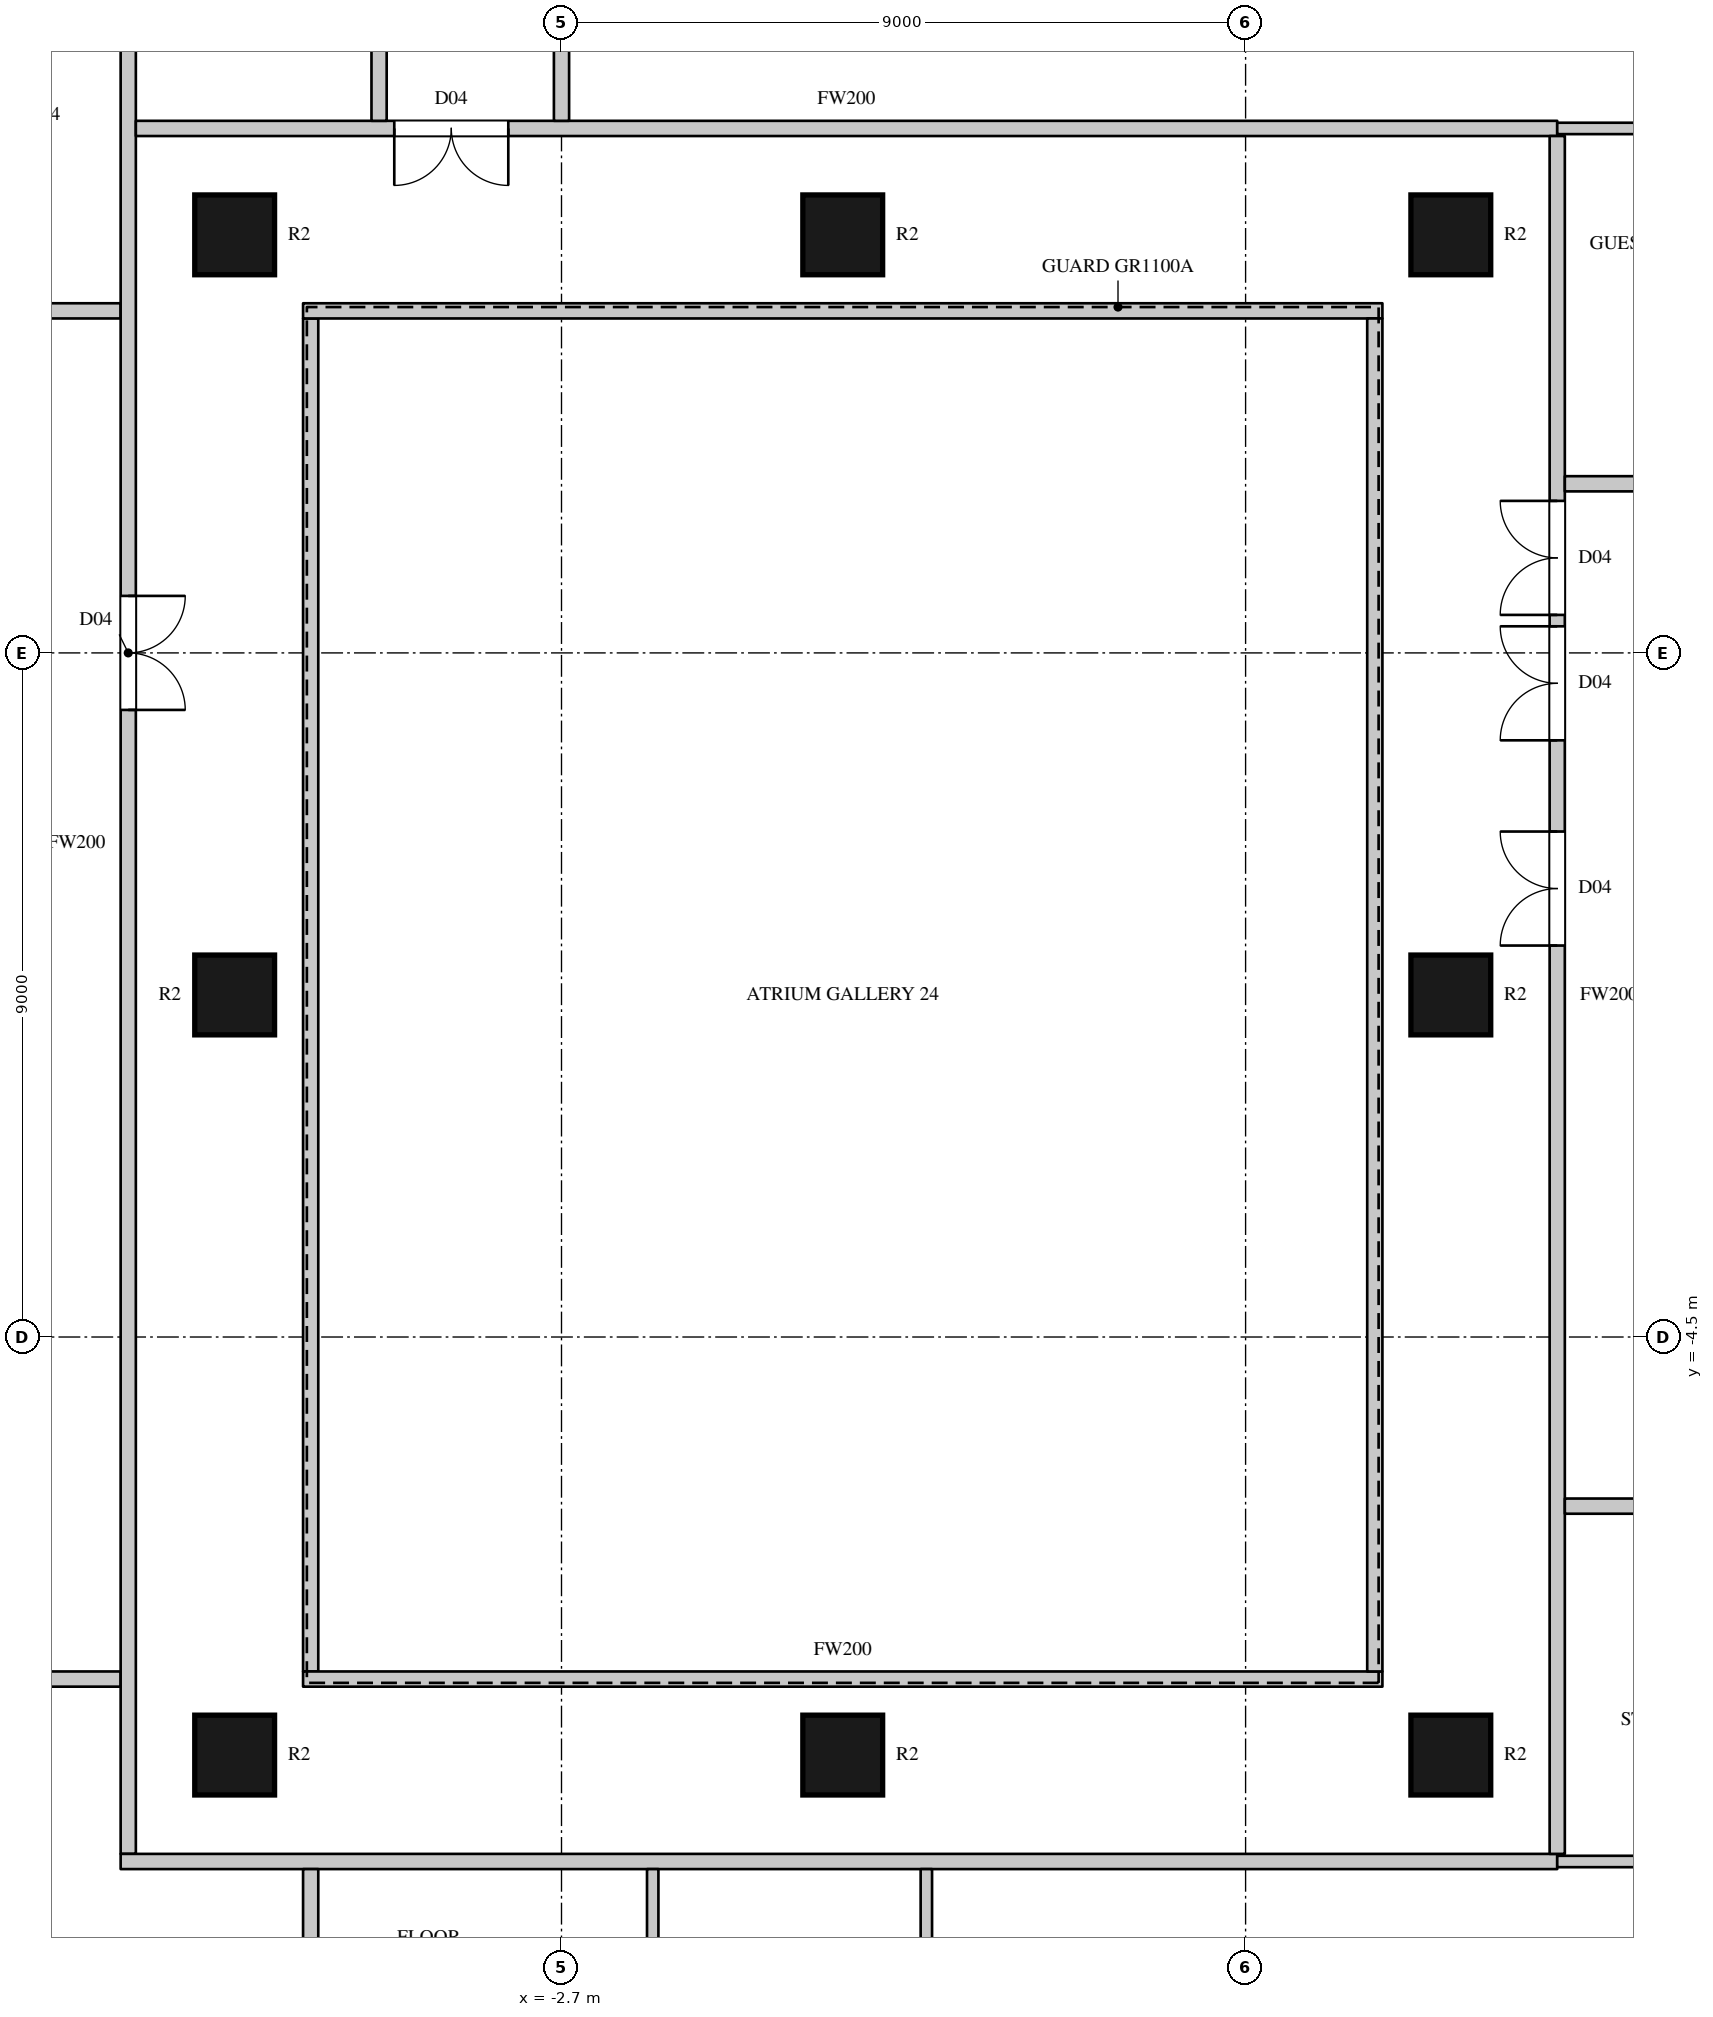
"""IFC4 building model, lengths in metres.
Left out: names, types, materials, properties, quantities, classifications, styles, units other than length and angle.
Written with IfcOpenShell. Run it as: python <this file> out.ifc"""

import sys

from ifc_helpers import new_model, si_unit, direction, frame, frame_2d, origin, origin_2d, place, context, subcontext, project, spatial, rectangle, circle, extrude, element, fill, save


model = new_model("IFC4")
c1 = context("Model", 3, precision=1e-05, world=origin(), true_north=direction((0.0, 1.0)))
c2 = subcontext(c1, "Body", "Model", "MODEL_VIEW")
j1 = project(units=[si_unit("LENGTHUNIT", "METRE"), si_unit("PLANEANGLEUNIT", "RADIAN")], contexts=[c1])
p1 = place(None, origin())
s1 = spatial("IfcSite", under=j1, at=p1, CompositionType="ELEMENT")
p2 = place(p1, origin())
s2 = spatial("IfcBuilding", under=s1, at=p2, CompositionType="ELEMENT")
p3 = place(p2, frame((0.0, 0.0, 116.7)))
s3 = spatial("IfcBuildingStorey", under=s2, at=p3, CompositionType="ELEMENT", Elevation=116.7)
for number, where, z_axis, x_axis in (
    (1, (-7.0, -10.0, 0.0), (0.0, 0.0, 1.0), (1.0, 0.0, 0.0)),
    (2, (-7.0, 0.0, 0.0), (0.0, 0.0, 1.0), (1.0, 0.0, 0.0)),
    (3, (-7.0, 10.0, 0.0), (0.0, 0.0, 1.0), (1.0, 0.0, 0.0)),
    (4, (1.0, -10.0, 0.0), (0.0, 0.0, 1.0), (1.0, 0.0, 0.0)),
    (5, (1.0, 10.0, 0.0), (0.0, 0.0, 1.0), (1.0, 0.0, 0.0)),
    (6, (9.0, -10.0, 0.0), (0.0, 0.0, 1.0), (1.0, 0.0, 0.0)),
    (7, (9.0, 0.0, 0.0), (0.0, 0.0, 1.0), (1.0, 0.0, 0.0)),
    (8, (9.0, 10.0, 0.0), (0.0, 0.0, 1.0), (1.0, 0.0, 0.0)),
):
    element("IfcColumn", number, at=place(p3, frame(where, z_axis=z_axis, x_axis=x_axis)), inside=s3, PredefinedType="COLUMN", context=c2, shape_type="SweptSolid", body=[
        extrude(circle(Radius=0.525, at=origin_2d()), origin(), (0.0, 0.0, 1.0), 3.6),
    ])
p4 = place(p3, frame((-13.97, -9.0, 0.0), z_axis=(0.0, 0.0, 1.0), x_axis=(1.0, 0.0, 0.0)))
e9 = element("IfcWall", 9, at=p4, inside=s3, PredefinedType="PARTITIONING", context=c2, shape_type="SweptSolid", body=[
    extrude(rectangle(XDim=5.47, YDim=0.2, at=frame_2d((2.735, 0.0))), origin(), (0.0, 0.0, 1.0), 3.3),
])
p5 = place(p4, frame((0.4, 0.0, 0.0)))
e10 = element("IfcOpeningElement", 10, at=p5, cuts=e9, PredefinedType="OPENING", context=c2, shape_type="SweptSolid", body=[
    extrude(rectangle(XDim=1.5, YDim=2.2, at=frame_2d((0.75, 1.1))), frame((0.0, 0.11, 0.0), z_axis=(0.0, -1.0, 0.0), x_axis=(1.0, 0.0, 0.0)), (0.0, 0.0, 1.0), 0.22),
])
p6 = place(p4, frame((2.05, 0.0, 0.0)))
e11 = element("IfcOpeningElement", 11, at=p6, cuts=e9, PredefinedType="OPENING", context=c2, shape_type="SweptSolid", body=[
    extrude(rectangle(XDim=1.5, YDim=2.2, at=frame_2d((0.75, 1.1))), frame((0.0, 0.11, 0.0), z_axis=(0.0, -1.0, 0.0), x_axis=(1.0, 0.0, 0.0)), (0.0, 0.0, 1.0), 0.22),
])
p7 = place(p3, frame((-13.97, 9.0, 0.0), z_axis=(0.0, 0.0, 1.0), x_axis=(1.0, 0.0, 0.0)))
e12 = element("IfcWall", 12, at=p7, inside=s3, PredefinedType="PARTITIONING", context=c2, shape_type="SweptSolid", body=[
    extrude(rectangle(XDim=5.47, YDim=0.2, at=frame_2d((2.735, 0.0))), origin(), (0.0, 0.0, 1.0), 3.3),
])
p8 = place(p3, frame((-8.4, -11.3, 0.0), z_axis=(0.0, 0.0, 1.0), x_axis=(0.0, 1.0, 0.0)))
e13 = element("IfcWall", 13, at=p8, inside=s3, PredefinedType="PARTITIONING", context=c2, shape_type="SweptSolid", body=[
    extrude(rectangle(XDim=26.6, YDim=0.2, at=frame_2d((13.3, 0.0))), origin(), (0.0, 0.0, 1.0), 3.3),
])
p9 = place(p8, frame((15.05, 0.0, 0.0)))
e14 = element("IfcOpeningElement", 14, at=p9, cuts=e13, PredefinedType="OPENING", context=c2, shape_type="SweptSolid", body=[
    extrude(rectangle(XDim=1.5, YDim=2.2, at=frame_2d((0.75, 1.1))), frame((0.0, 0.11, 0.0), z_axis=(0.0, -1.0, 0.0), x_axis=(1.0, 0.0, 0.0)), (0.0, 0.0, 1.0), 0.22),
])
p10 = place(p8, frame((25.55, 0.0, 0.0)))
e15 = element("IfcOpeningElement", 15, at=p10, cuts=e13, PredefinedType="OPENING", context=c2, shape_type="SweptSolid", body=[
    extrude(rectangle(XDim=0.9, YDim=2.2, at=frame_2d((0.45, 1.1))), frame((0.0, 0.11, 0.0), z_axis=(0.0, -1.0, 0.0), x_axis=(1.0, 0.0, 0.0)), (0.0, 0.0, 1.0), 0.22),
])
p11 = place(p3, frame((-8.5, -11.4, 0.0), z_axis=(0.0, 0.0, 1.0), x_axis=(1.0, 0.0, 0.0)))
e16 = element("IfcWall", 16, at=p11, inside=s3, PredefinedType="PARTITIONING", context=c2, shape_type="SweptSolid", body=[
    extrude(rectangle(XDim=18.9, YDim=0.2, at=frame_2d((9.45, 0.0))), origin(), (0.0, 0.0, 1.0), 3.3),
])
p12 = place(p3, frame((-8.3, 11.4, 0.0), z_axis=(0.0, 0.0, 1.0), x_axis=(1.0, 0.0, 0.0)))
e17 = element("IfcWall", 17, at=p12, inside=s3, PredefinedType="PARTITIONING", context=c2, shape_type="SweptSolid", body=[
    extrude(rectangle(XDim=18.7, YDim=0.2, at=frame_2d((9.35, 0.0))), origin(), (0.0, 0.0, 1.0), 3.3),
])
p13 = place(p12, frame((3.4, 0.0, 0.0)))
e18 = element("IfcOpeningElement", 18, at=p13, cuts=e17, PredefinedType="OPENING", context=c2, shape_type="SweptSolid", body=[
    extrude(rectangle(XDim=1.5, YDim=2.2, at=frame_2d((0.75, 1.1))), frame((0.0, 0.11, 0.0), z_axis=(0.0, -1.0, 0.0), x_axis=(1.0, 0.0, 0.0)), (0.0, 0.0, 1.0), 0.22),
])
p14 = place(p3, frame((-6.0, -15.3, 0.0), z_axis=(0.0, 0.0, 1.0), x_axis=(0.0, 1.0, 0.0)))
e19 = element("IfcWall", 19, at=p14, inside=s3, PredefinedType="PARTITIONING", context=c2, shape_type="SweptSolid", body=[
    extrude(rectangle(XDim=3.8, YDim=0.2, at=frame_2d((1.9, 0.0))), origin(), (0.0, 0.0, 1.0), 3.3),
])
p15 = place(p14, frame((0.15, 0.0, 0.0)))
e20 = element("IfcOpeningElement", 20, at=p15, cuts=e19, PredefinedType="OPENING", context=c2, shape_type="SweptSolid", body=[
    extrude(rectangle(XDim=0.95, YDim=2.2, at=frame_2d((0.475, 1.1))), frame((0.0, 0.11, 0.0), z_axis=(0.0, -1.0, 0.0), x_axis=(1.0, 0.0, 0.0)), (0.0, 0.0, 1.0), 0.22),
])
p16 = place(p3, frame((-6.0, -8.9, 0.0), z_axis=(0.0, 0.0, 1.0), x_axis=(0.0, 1.0, 0.0)))
e21 = element("IfcWall", 21, at=p16, inside=s3, PredefinedType="PARTITIONING", context=c2, shape_type="SweptSolid", body=[
    extrude(rectangle(XDim=17.8, YDim=0.2, at=frame_2d((8.9, 0.0))), origin(), (0.0, 0.0, 1.0), 3.3),
])
for number, where, z_axis, x_axis in (
    (22, (-6.1, -9.0, 0.0), (0.0, 0.0, 1.0), (1.0, 0.0, 0.0)),
    (23, (-6.1, 9.0, 0.0), (0.0, 0.0, 1.0), (1.0, 0.0, 0.0)),
):
    element("IfcWall", number, at=place(p3, frame(where, z_axis=z_axis, x_axis=x_axis)), inside=s3, PredefinedType="PARTITIONING", context=c2, shape_type="SweptSolid", body=[
        extrude(rectangle(XDim=14.2, YDim=0.2, at=frame_2d((7.1, 0.0))), origin(), (0.0, 0.0, 1.0), 3.3),
    ])
p17 = place(p3, frame((-5.1, 11.5, 0.0), z_axis=(0.0, 0.0, 1.0), x_axis=(0.0, 1.0, 0.0)))
e24 = element("IfcWall", 24, at=p17, inside=s3, PredefinedType="PARTITIONING", context=c2, shape_type="SweptSolid", body=[
    extrude(rectangle(XDim=3.8, YDim=0.2, at=frame_2d((1.9, 0.0))), origin(), (0.0, 0.0, 1.0), 3.3),
])
p18 = place(p3, frame((-2.7, 11.5, 0.0), z_axis=(0.0, 0.0, 1.0), x_axis=(0.0, 1.0, 0.0)))
e25 = element("IfcWall", 25, at=p18, inside=s3, PredefinedType="PARTITIONING", context=c2, shape_type="SweptSolid", body=[
    extrude(rectangle(XDim=3.8, YDim=0.2, at=frame_2d((1.9, 0.0))), origin(), (0.0, 0.0, 1.0), 2.75),
])
p19 = place(p18, frame((2.75, 0.0, 0.0)))
e26 = element("IfcOpeningElement", 26, at=p19, cuts=e25, PredefinedType="OPENING", context=c2, shape_type="SweptSolid", body=[
    extrude(rectangle(XDim=0.9, YDim=2.2, at=frame_2d((0.45, 1.1))), frame((0.0, 0.11, 0.0), z_axis=(0.0, -1.0, 0.0), x_axis=(1.0, 0.0, 0.0)), (0.0, 0.0, 1.0), 0.22),
])
p20 = place(p3, frame((8.0, -8.9, 0.0), z_axis=(0.0, 0.0, 1.0), x_axis=(0.0, 1.0, 0.0)))
e27 = element("IfcWall", 27, at=p20, inside=s3, PredefinedType="PARTITIONING", context=c2, shape_type="SweptSolid", body=[
    extrude(rectangle(XDim=17.8, YDim=0.2, at=frame_2d((8.9, 0.0))), origin(), (0.0, 0.0, 1.0), 3.3),
])
p21 = place(p3, frame((10.4, -11.3, 0.0), z_axis=(0.0, 0.0, 1.0), x_axis=(0.0, 1.0, 0.0)))
e28 = element("IfcWall", 28, at=p21, inside=s3, PredefinedType="PARTITIONING", context=c2, shape_type="SweptSolid", body=[
    extrude(rectangle(XDim=22.6, YDim=0.2, at=frame_2d((11.3, 0.0))), origin(), (0.0, 0.0, 1.0), 3.3),
])
p22 = place(p21, frame((16.3, 0.0, 0.0)))
e29 = element("IfcOpeningElement", 29, at=p22, cuts=e28, PredefinedType="OPENING", context=c2, shape_type="SweptSolid", body=[
    extrude(rectangle(XDim=1.5, YDim=2.2, at=frame_2d((0.75, 1.1))), frame((0.0, 0.11, 0.0), z_axis=(0.0, -1.0, 0.0), x_axis=(1.0, 0.0, 0.0)), (0.0, 0.0, 1.0), 0.22),
])
p23 = place(p21, frame((14.65, 0.0, 0.0)))
e30 = element("IfcOpeningElement", 30, at=p23, cuts=e28, PredefinedType="OPENING", context=c2, shape_type="SweptSolid", body=[
    extrude(rectangle(XDim=1.5, YDim=2.2, at=frame_2d((0.75, 1.1))), frame((0.0, 0.11, 0.0), z_axis=(0.0, -1.0, 0.0), x_axis=(1.0, 0.0, 0.0)), (0.0, 0.0, 1.0), 0.22),
])
p24 = place(p21, frame((11.95, 0.0, 0.0)))
e31 = element("IfcOpeningElement", 31, at=p24, cuts=e28, PredefinedType="OPENING", context=c2, shape_type="SweptSolid", body=[
    extrude(rectangle(XDim=1.5, YDim=2.2, at=frame_2d((0.75, 1.1))), frame((0.0, 0.11, 0.0), z_axis=(0.0, -1.0, 0.0), x_axis=(1.0, 0.0, 0.0)), (0.0, 0.0, 1.0), 0.22),
])
p25 = place(p3, frame((10.5, -6.725, 0.0), z_axis=(0.0, 0.0, 1.0), x_axis=(1.0, 0.0, 0.0)))
e32 = element("IfcWall", 32, at=p25, inside=s3, PredefinedType="PARTITIONING", context=c2, shape_type="SweptSolid", body=[
    extrude(rectangle(XDim=3.6, YDim=0.2, at=frame_2d((1.8, 0.0))), origin(), (0.0, 0.0, 1.0), 3.3),
])
p26 = place(p25, frame((2.3, 0.0, 0.0)))
e33 = element("IfcOpeningElement", 33, at=p26, cuts=e32, PredefinedType="OPENING", context=c2, shape_type="SweptSolid", body=[
    extrude(rectangle(XDim=0.95, YDim=2.2, at=frame_2d((0.475, 1.1))), frame((0.0, 0.11, 0.0), z_axis=(0.0, -1.0, 0.0), x_axis=(1.0, 0.0, 0.0)), (0.0, 0.0, 1.0), 0.22),
])
p27 = place(p3, frame((10.5, 6.725, 0.0), z_axis=(0.0, 0.0, 1.0), x_axis=(1.0, 0.0, 0.0)))
e34 = element("IfcWall", 34, at=p27, inside=s3, PredefinedType="PARTITIONING", context=c2, shape_type="SweptSolid", body=[
    extrude(rectangle(XDim=3.6, YDim=0.2, at=frame_2d((1.8, 0.0))), origin(), (0.0, 0.0, 1.0), 3.3),
])
p28 = place(p27, frame((1.65, 0.0, 0.0)))
e35 = element("IfcOpeningElement", 35, at=p28, cuts=e34, PredefinedType="OPENING", context=c2, shape_type="SweptSolid", body=[
    extrude(rectangle(XDim=1.6, YDim=2.4, at=frame_2d((0.8, 1.2))), frame((0.0, 0.11, 0.0), z_axis=(0.0, -1.0, 0.0), x_axis=(1.0, 0.0, 0.0)), (0.0, 0.0, 1.0), 0.22),
])
for number, where, z_axis, x_axis in (
    (36, (-1.5, -15.3, 0.0), (0.0, 0.0, 1.0), (0.0, 1.0, 0.0)),
    (37, (2.1, -15.3, 0.0), (0.0, 0.0, 1.0), (0.0, 1.0, 0.0)),
):
    element("IfcWall", number, at=place(p3, frame(where, z_axis=z_axis, x_axis=x_axis)), inside=s3, PredefinedType="PARTITIONING", context=c2, shape_type="SweptSolid", body=[
        extrude(rectangle(XDim=3.8, YDim=0.15, at=frame_2d((1.9, 0.0))), origin(), (0.0, 0.0, 1.0), 3.3),
    ])
for number, where, z_axis, x_axis in (
    (38, (10.4, -11.4, 0.0), (0.0, 0.0, 1.0), (1.0, 0.0, 0.0)),
    (39, (10.4, 11.4, 0.0), (0.0, 0.0, 1.0), (1.0, 0.0, 0.0)),
):
    element("IfcWall", number, at=place(p3, frame(where, z_axis=z_axis, x_axis=x_axis)), inside=s3, PredefinedType="PARTITIONING", context=c2, shape_type="SweptSolid", body=[
        extrude(rectangle(XDim=3.5, YDim=0.15, at=frame_2d((1.75, 0.0))), origin(), (0.0, 0.0, 1.0), 3.3),
    ])
p29 = place(p9, origin())
e40 = element("IfcDoor", 40, at=p29, inside=s3, OperationType="DOUBLE_DOOR_SINGLE_SWING", PredefinedType="DOOR", context=c2, shape_type="SweptSolid", body=[
    extrude(rectangle(XDim=1.5, YDim=2.2, at=frame_2d((0.75, 1.1))), frame((0.0, 0.025, 0.0), z_axis=(0.0, -1.0, 0.0), x_axis=(1.0, 0.0, 0.0)), (0.0, 0.0, 1.0), 0.05),
])
fill(e14, e40)
p30 = place(p13, origin())
e41 = element("IfcDoor", 41, at=p30, inside=s3, OperationType="DOUBLE_DOOR_SINGLE_SWING", PredefinedType="DOOR", context=c2, shape_type="SweptSolid", body=[
    extrude(rectangle(XDim=1.5, YDim=2.2, at=frame_2d((0.75, 1.1))), frame((0.0, 0.025, 0.0), z_axis=(0.0, -1.0, 0.0), x_axis=(1.0, 0.0, 0.0)), (0.0, 0.0, 1.0), 0.05),
])
fill(e18, e41)
p31 = place(p22, origin())
e42 = element("IfcDoor", 42, at=p31, inside=s3, OperationType="DOUBLE_DOOR_SINGLE_SWING", PredefinedType="DOOR", context=c2, shape_type="SweptSolid", body=[
    extrude(rectangle(XDim=1.5, YDim=2.2, at=frame_2d((0.75, 1.1))), frame((0.0, 0.025, 0.0), z_axis=(0.0, -1.0, 0.0), x_axis=(1.0, 0.0, 0.0)), (0.0, 0.0, 1.0), 0.05),
])
fill(e29, e42)
p32 = place(p23, origin())
e43 = element("IfcDoor", 43, at=p32, inside=s3, OperationType="DOUBLE_DOOR_SINGLE_SWING", PredefinedType="DOOR", context=c2, shape_type="SweptSolid", body=[
    extrude(rectangle(XDim=1.5, YDim=2.2, at=frame_2d((0.75, 1.1))), frame((0.0, 0.025, 0.0), z_axis=(0.0, -1.0, 0.0), x_axis=(1.0, 0.0, 0.0)), (0.0, 0.0, 1.0), 0.05),
])
fill(e30, e43)
p33 = place(p24, origin())
e44 = element("IfcDoor", 44, at=p33, inside=s3, OperationType="DOUBLE_DOOR_SINGLE_SWING", PredefinedType="DOOR", context=c2, shape_type="SweptSolid", body=[
    extrude(rectangle(XDim=1.5, YDim=2.2, at=frame_2d((0.75, 1.1))), frame((0.0, 0.025, 0.0), z_axis=(0.0, -1.0, 0.0), x_axis=(1.0, 0.0, 0.0)), (0.0, 0.0, 1.0), 0.05),
])
fill(e31, e44)
save(model, sys.argv[1])
